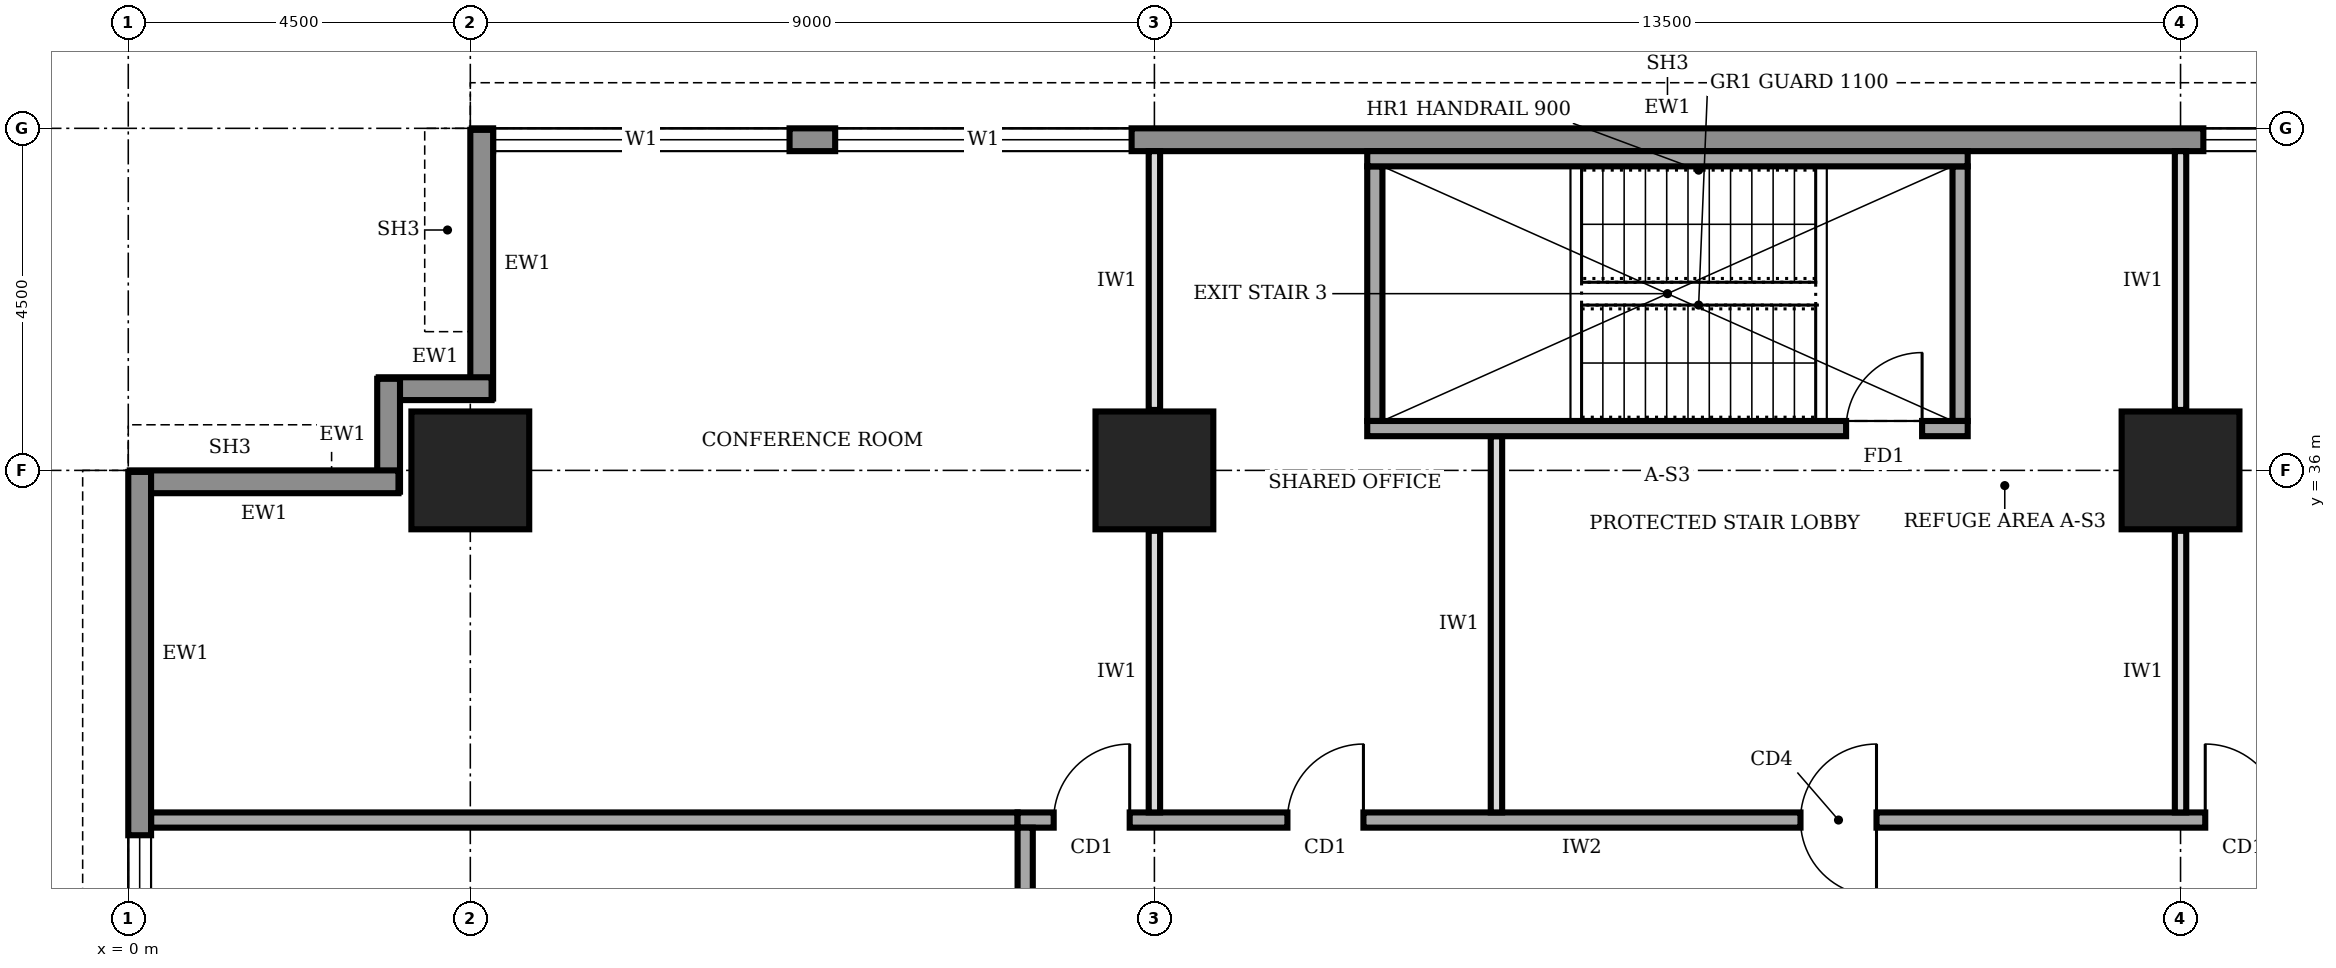
"""IFC4 building model, lengths in metres.
Left out: names, types, materials, properties, quantities, classifications, styles, units other than length and angle.
Written with IfcOpenShell. Run it as: python <this file> out.ifc"""

import sys

from ifc_helpers import new_model, si_unit, direction, frame, frame_2d, origin, origin_2d, place, context, subcontext, project, spatial, rectangle, extrude, element, fill, save


model = new_model("IFC4")
c1 = context("Model", 3, precision=1e-05, world=origin(), true_north=direction((0.0, 1.0)))
c2 = subcontext(c1, "Body", "Model", "MODEL_VIEW")
j1 = project(units=[si_unit("LENGTHUNIT", "METRE"), si_unit("PLANEANGLEUNIT", "RADIAN")], contexts=[c1])
p1 = place(None, origin())
s1 = spatial("IfcSite", under=j1, at=p1, CompositionType="ELEMENT")
p2 = place(p1, origin())
s2 = spatial("IfcBuilding", under=s1, at=p2, CompositionType="ELEMENT")
p3 = place(p2, frame((0.0, 0.0, 205.0)))
s3 = spatial("IfcBuildingStorey", under=s2, at=p3, CompositionType="ELEMENT", Elevation=205.0)
for number, where, z_axis, x_axis in (
    (1, (4.5, 36.0, 0.0), (0.0, 0.0, 1.0), (1.0, 0.0, 0.0)),
    (2, (13.5, 36.0, 0.0), (0.0, 0.0, 1.0), (1.0, 0.0, 0.0)),
    (3, (27.0, 36.0, 0.0), (0.0, 0.0, 1.0), (1.0, 0.0, 0.0)),
):
    element("IfcColumn", number, at=place(p3, frame(where, z_axis=z_axis, x_axis=x_axis)), inside=s3, PredefinedType="COLUMN", context=c2, shape_type="SweptSolid", body=[
        extrude(rectangle(XDim=1.55, YDim=1.55, at=origin_2d()), origin(), (0.0, 0.0, 1.0), 4.0),
    ])
p4 = place(p3, frame((35.98, 40.35, 0.0), z_axis=(0.0, 0.0, 1.0), x_axis=(-1.0, 0.0, 0.0)))
e4 = element("IfcWall", 4, at=p4, inside=s3, PredefinedType="STANDARD", context=c2, shape_type="SweptSolid", body=[
    extrude(rectangle(XDim=31.46, YDim=0.3, at=frame_2d((15.73, 0.0))), origin(), (0.0, 0.0, 1.0), 3.75),
])
p5 = place(p4, frame((27.28, 0.0, 0.9)))
e5 = element("IfcOpeningElement", 5, at=p5, cuts=e4, PredefinedType="OPENING", context=c2, shape_type="SweptSolid", body=[
    extrude(rectangle(XDim=3.9, YDim=2.2, at=frame_2d((1.95, 1.1))), frame((0.0, 0.16, 0.0), z_axis=(0.0, -1.0, 0.0), x_axis=(1.0, 0.0, 0.0)), (0.0, 0.0, 1.0), 0.32),
])
p6 = place(p4, frame((22.78, 0.0, 0.9)))
e6 = element("IfcOpeningElement", 6, at=p6, cuts=e4, PredefinedType="OPENING", context=c2, shape_type="SweptSolid", body=[
    extrude(rectangle(XDim=3.9, YDim=2.2, at=frame_2d((1.95, 1.1))), frame((0.0, 0.16, 0.0), z_axis=(0.0, -1.0, 0.0), x_axis=(1.0, 0.0, 0.0)), (0.0, 0.0, 1.0), 0.32),
])
p7 = place(p4, frame((4.78, 0.0, 0.9)))
e7 = element("IfcOpeningElement", 7, at=p7, cuts=e4, PredefinedType="OPENING", context=c2, shape_type="SweptSolid", body=[
    extrude(rectangle(XDim=3.9, YDim=2.2, at=frame_2d((1.95, 1.1))), frame((0.0, 0.16, 0.0), z_axis=(0.0, -1.0, 0.0), x_axis=(1.0, 0.0, 0.0)), (0.0, 0.0, 1.0), 0.32),
])
p8 = place(p3, frame((4.65, 40.48, 0.0), z_axis=(0.0, 0.0, 1.0), x_axis=(0.0, -1.0, 0.0)))
e8 = element("IfcWall", 8, at=p8, inside=s3, PredefinedType="STANDARD", context=c2, shape_type="SweptSolid", body=[
    extrude(rectangle(XDim=3.535, YDim=0.3, at=frame_2d((1.768, 0.0))), origin(), (0.0, 0.0, 1.0), 2.85),
])
for number, where, z_axis, x_axis in (
    (9, (4.78, 37.075, 0.0), (0.0, 0.0, 1.0), (-1.0, 0.0, 0.0)),
    (10, (3.425, 37.205, 0.0), (0.0, 0.0, 1.0), (0.0, -1.0, 0.0)),
):
    element("IfcWall", number, at=place(p3, frame(where, z_axis=z_axis, x_axis=x_axis)), inside=s3, PredefinedType="STANDARD", context=c2, shape_type="SweptSolid", body=[
        extrude(rectangle(XDim=1.485, YDim=0.3, at=frame_2d((0.743, 0.0))), origin(), (0.0, 0.0, 1.0), 3.75),
    ])
p9 = place(p3, frame((3.555, 35.85, 0.0), z_axis=(0.0, 0.0, 1.0), x_axis=(-1.0, 0.0, 0.0)))
e11 = element("IfcWall", 11, at=p9, inside=s3, PredefinedType="STANDARD", context=c2, shape_type="SweptSolid", body=[
    extrude(rectangle(XDim=3.535, YDim=0.3, at=frame_2d((1.768, 0.0))), origin(), (0.0, 0.0, 1.0), 2.85),
])
p10 = place(p3, frame((0.15, 35.98, 0.0), z_axis=(0.0, 0.0, 1.0), x_axis=(0.0, -1.0, 0.0)))
e12 = element("IfcWall", 12, at=p10, inside=s3, PredefinedType="STANDARD", context=c2, shape_type="SweptSolid", body=[
    extrude(rectangle(XDim=31.46, YDim=0.3, at=frame_2d((15.73, 0.0))), origin(), (0.0, 0.0, 1.0), 3.75),
])
p11 = place(p10, frame((27.28, 0.0, 0.9)))
e13 = element("IfcOpeningElement", 13, at=p11, cuts=e12, PredefinedType="OPENING", context=c2, shape_type="SweptSolid", body=[
    extrude(rectangle(XDim=3.9, YDim=2.2, at=frame_2d((1.95, 1.1))), frame((0.0, 0.16, 0.0), z_axis=(0.0, -1.0, 0.0), x_axis=(1.0, 0.0, 0.0)), (0.0, 0.0, 1.0), 0.32),
])
p12 = place(p10, frame((22.78, 0.0, 0.9)))
e14 = element("IfcOpeningElement", 14, at=p12, cuts=e12, PredefinedType="OPENING", context=c2, shape_type="SweptSolid", body=[
    extrude(rectangle(XDim=3.9, YDim=2.2, at=frame_2d((1.95, 1.1))), frame((0.0, 0.16, 0.0), z_axis=(0.0, -1.0, 0.0), x_axis=(1.0, 0.0, 0.0)), (0.0, 0.0, 1.0), 0.32),
])
p13 = place(p10, frame((18.28, 0.0, 0.9)))
e15 = element("IfcOpeningElement", 15, at=p13, cuts=e12, PredefinedType="OPENING", context=c2, shape_type="SweptSolid", body=[
    extrude(rectangle(XDim=3.9, YDim=2.2, at=frame_2d((1.95, 1.1))), frame((0.0, 0.16, 0.0), z_axis=(0.0, -1.0, 0.0), x_axis=(1.0, 0.0, 0.0)), (0.0, 0.0, 1.0), 0.32),
])
p14 = place(p10, frame((13.78, 0.0, 0.9)))
e16 = element("IfcOpeningElement", 16, at=p14, cuts=e12, PredefinedType="OPENING", context=c2, shape_type="SweptSolid", body=[
    extrude(rectangle(XDim=3.9, YDim=2.2, at=frame_2d((1.95, 1.1))), frame((0.0, 0.16, 0.0), z_axis=(0.0, -1.0, 0.0), x_axis=(1.0, 0.0, 0.0)), (0.0, 0.0, 1.0), 0.32),
])
p15 = place(p10, frame((9.28, 0.0, 0.9)))
e17 = element("IfcOpeningElement", 17, at=p15, cuts=e12, PredefinedType="OPENING", context=c2, shape_type="SweptSolid", body=[
    extrude(rectangle(XDim=3.9, YDim=2.2, at=frame_2d((1.95, 1.1))), frame((0.0, 0.16, 0.0), z_axis=(0.0, -1.0, 0.0), x_axis=(1.0, 0.0, 0.0)), (0.0, 0.0, 1.0), 0.32),
])
p16 = place(p10, frame((4.78, 0.0, 0.9)))
e18 = element("IfcOpeningElement", 18, at=p16, cuts=e12, PredefinedType="OPENING", context=c2, shape_type="SweptSolid", body=[
    extrude(rectangle(XDim=3.9, YDim=2.2, at=frame_2d((1.95, 1.1))), frame((0.0, 0.16, 0.0), z_axis=(0.0, -1.0, 0.0), x_axis=(1.0, 0.0, 0.0)), (0.0, 0.0, 1.0), 0.32),
])
p17 = place(p3, frame((28.6, 31.4, 0.0), z_axis=(0.0, 0.0, 1.0), x_axis=(-1.0, 0.0, 0.0)))
e19 = element("IfcWall", 19, at=p17, inside=s3, PredefinedType="SOLIDWALL", context=c2, shape_type="SweptSolid", body=[
    extrude(rectangle(XDim=16.9, YDim=0.2, at=frame_2d((8.45, 0.0))), origin(), (0.0, 0.0, 1.0), 3.75),
])
p18 = place(p17, frame((15.425, 0.0, 0.0)))
e20 = element("IfcOpeningElement", 20, at=p18, cuts=e19, PredefinedType="OPENING", context=c2, shape_type="SweptSolid", body=[
    extrude(rectangle(XDim=1.0, YDim=2.1, at=frame_2d((0.5, 1.05))), frame((0.0, 0.11, 0.0), z_axis=(0.0, -1.0, 0.0), x_axis=(1.0, 0.0, 0.0)), (0.0, 0.0, 1.0), 0.22),
])
p19 = place(p17, frame((12.35, 0.0, 0.0)))
e21 = element("IfcOpeningElement", 21, at=p19, cuts=e19, PredefinedType="OPENING", context=c2, shape_type="SweptSolid", body=[
    extrude(rectangle(XDim=1.0, YDim=2.1, at=frame_2d((0.5, 1.05))), frame((0.0, 0.11, 0.0), z_axis=(0.0, -1.0, 0.0), x_axis=(1.0, 0.0, 0.0)), (0.0, 0.0, 1.0), 0.22),
])
p20 = place(p17, frame((5.6, 0.0, 0.0)))
e22 = element("IfcOpeningElement", 22, at=p20, cuts=e19, PredefinedType="OPENING", context=c2, shape_type="SweptSolid", body=[
    extrude(rectangle(XDim=1.0, YDim=2.1, at=frame_2d((0.5, 1.05))), frame((0.0, 0.11, 0.0), z_axis=(0.0, -1.0, 0.0), x_axis=(1.0, 0.0, 0.0)), (0.0, 0.0, 1.0), 0.22),
])
p21 = place(p17, frame((0.275, 0.0, 0.0)))
e23 = element("IfcOpeningElement", 23, at=p21, cuts=e19, PredefinedType="OPENING", context=c2, shape_type="SweptSolid", body=[
    extrude(rectangle(XDim=1.0, YDim=2.1, at=frame_2d((0.5, 1.05))), frame((0.0, 0.11, 0.0), z_axis=(0.0, -1.0, 0.0), x_axis=(1.0, 0.0, 0.0)), (0.0, 0.0, 1.0), 0.22),
])
p22 = place(p3, frame((11.8, 31.3, 0.0), z_axis=(0.0, 0.0, 1.0), x_axis=(0.0, -1.0, 0.0)))
e24 = element("IfcWall", 24, at=p22, inside=s3, PredefinedType="SOLIDWALL", context=c2, shape_type="SweptSolid", body=[
    extrude(rectangle(XDim=23.8, YDim=0.2, at=frame_2d((11.9, 0.0))), origin(), (0.0, 0.0, 1.0), 3.75),
])
p23 = place(p22, frame((20.3, 0.0, 0.0)))
e25 = element("IfcOpeningElement", 25, at=p23, cuts=e24, PredefinedType="OPENING", context=c2, shape_type="SweptSolid", body=[
    extrude(rectangle(XDim=1.0, YDim=2.1, at=frame_2d((0.5, 1.05))), frame((0.0, 0.11, 0.0), z_axis=(0.0, -1.0, 0.0), x_axis=(1.0, 0.0, 0.0)), (0.0, 0.0, 1.0), 0.22),
])
p24 = place(p22, frame((15.45, 0.0, 0.0)))
e26 = element("IfcOpeningElement", 26, at=p24, cuts=e24, PredefinedType="OPENING", context=c2, shape_type="SweptSolid", body=[
    extrude(rectangle(XDim=0.9, YDim=2.1, at=frame_2d((0.45, 1.05))), frame((0.0, 0.11, 0.0), z_axis=(0.0, -1.0, 0.0), x_axis=(1.0, 0.0, 0.0)), (0.0, 0.0, 1.0), 0.22),
])
p25 = place(p22, frame((12.45, 0.0, 0.0)))
e27 = element("IfcOpeningElement", 27, at=p25, cuts=e24, PredefinedType="OPENING", context=c2, shape_type="SweptSolid", body=[
    extrude(rectangle(XDim=0.9, YDim=2.1, at=frame_2d((0.45, 1.05))), frame((0.0, 0.11, 0.0), z_axis=(0.0, -1.0, 0.0), x_axis=(1.0, 0.0, 0.0)), (0.0, 0.0, 1.0), 0.22),
])
p26 = place(p22, frame((7.6, 0.0, 0.0)))
e28 = element("IfcOpeningElement", 28, at=p26, cuts=e24, PredefinedType="OPENING", context=c2, shape_type="SweptSolid", body=[
    extrude(rectangle(XDim=0.9, YDim=2.1, at=frame_2d((0.45, 1.05))), frame((0.0, 0.11, 0.0), z_axis=(0.0, -1.0, 0.0), x_axis=(1.0, 0.0, 0.0)), (0.0, 0.0, 1.0), 0.22),
])
p27 = place(p22, frame((4.8, 0.0, 0.0)))
e29 = element("IfcOpeningElement", 29, at=p27, cuts=e24, PredefinedType="OPENING", context=c2, shape_type="SweptSolid", body=[
    extrude(rectangle(XDim=1.0, YDim=2.1, at=frame_2d((0.5, 1.05))), frame((0.0, 0.11, 0.0), z_axis=(0.0, -1.0, 0.0), x_axis=(1.0, 0.0, 0.0)), (0.0, 0.0, 1.0), 0.22),
])
p28 = place(p22, frame((10.3, 0.0, 0.0)))
e30 = element("IfcOpeningElement", 30, at=p28, cuts=e24, PredefinedType="OPENING", context=c2, shape_type="SweptSolid", body=[
    extrude(rectangle(XDim=1.0, YDim=2.1, at=frame_2d((0.5, 1.05))), frame((0.0, 0.11, 0.0), z_axis=(0.0, -1.0, 0.0), x_axis=(1.0, 0.0, 0.0)), (0.0, 0.0, 1.0), 0.22),
])
p29 = place(p22, frame((1.55, 0.0, 0.0)))
e31 = element("IfcOpeningElement", 31, at=p29, cuts=e24, PredefinedType="OPENING", context=c2, shape_type="SweptSolid", body=[
    extrude(rectangle(XDim=1.0, YDim=2.1, at=frame_2d((0.5, 1.05))), frame((0.0, 0.11, 0.0), z_axis=(0.0, -1.0, 0.0), x_axis=(1.0, 0.0, 0.0)), (0.0, 0.0, 1.0), 0.22),
])
p30 = place(p3, frame((0.3, 31.4, 0.0), z_axis=(0.0, 0.0, 1.0), x_axis=(1.0, 0.0, 0.0)))
e32 = element("IfcWall", 32, at=p30, inside=s3, PredefinedType="SOLIDWALL", context=c2, shape_type="SweptSolid", body=[
    extrude(rectangle(XDim=11.4, YDim=0.2, at=frame_2d((5.7, 0.0))), origin(), (0.0, 0.0, 1.0), 3.75),
])
p31 = place(p3, frame((13.5, 31.5, 0.0), z_axis=(0.0, 0.0, 1.0), x_axis=(0.0, 1.0, 0.0)))
e33 = element("IfcWall", 33, at=p31, inside=s3, PredefinedType="PARTITIONING", context=c2, shape_type="SweptSolid", body=[
    extrude(rectangle(XDim=3.705, YDim=0.15, at=frame_2d((1.853, 0.0))), origin(), (0.0, 0.0, 1.0), 2.85),
])
p32 = place(p3, frame((13.5, 36.795, 0.0), z_axis=(0.0, 0.0, 1.0), x_axis=(0.0, 1.0, 0.0)))
e34 = element("IfcWall", 34, at=p32, inside=s3, PredefinedType="PARTITIONING", context=c2, shape_type="SweptSolid", body=[
    extrude(rectangle(XDim=3.405, YDim=0.15, at=frame_2d((1.703, 0.0))), origin(), (0.0, 0.0, 1.0), 2.85),
])
p33 = place(p3, frame((18.0, 31.5, 0.0), z_axis=(0.0, 0.0, 1.0), x_axis=(0.0, 1.0, 0.0)))
e35 = element("IfcWall", 35, at=p33, inside=s3, PredefinedType="PARTITIONING", context=c2, shape_type="SweptSolid", body=[
    extrude(rectangle(XDim=4.95, YDim=0.15, at=frame_2d((2.475, 0.0))), origin(), (0.0, 0.0, 1.0), 3.75),
])
p34 = place(p3, frame((27.0, 31.5, 0.0), z_axis=(0.0, 0.0, 1.0), x_axis=(0.0, 1.0, 0.0)))
e36 = element("IfcWall", 36, at=p34, inside=s3, PredefinedType="PARTITIONING", context=c2, shape_type="SweptSolid", body=[
    extrude(rectangle(XDim=3.705, YDim=0.15, at=frame_2d((1.853, 0.0))), origin(), (0.0, 0.0, 1.0), 2.85),
])
p35 = place(p3, frame((27.0, 36.795, 0.0), z_axis=(0.0, 0.0, 1.0), x_axis=(0.0, 1.0, 0.0)))
e37 = element("IfcWall", 37, at=p35, inside=s3, PredefinedType="PARTITIONING", context=c2, shape_type="SweptSolid", body=[
    extrude(rectangle(XDim=3.405, YDim=0.15, at=frame_2d((1.703, 0.0))), origin(), (0.0, 0.0, 1.0), 2.85),
])
p36 = place(p3, frame((16.3, 36.55, 0.0), z_axis=(0.0, 0.0, 1.0), x_axis=(1.0, 0.0, 0.0)))
e38 = element("IfcWall", 38, at=p36, inside=s3, PredefinedType="SOLIDWALL", context=c2, shape_type="SweptSolid", body=[
    extrude(rectangle(XDim=7.9, YDim=0.2, at=frame_2d((3.95, 0.0))), origin(), (0.0, 0.0, 1.0), 3.75),
])
p37 = place(p36, frame((6.3, 0.0, 0.0)))
e39 = element("IfcOpeningElement", 39, at=p37, cuts=e38, PredefinedType="OPENING", context=c2, shape_type="SweptSolid", body=[
    extrude(rectangle(XDim=1.0, YDim=2.1, at=frame_2d((0.5, 1.05))), frame((0.0, 0.11, 0.0), z_axis=(0.0, -1.0, 0.0), x_axis=(1.0, 0.0, 0.0)), (0.0, 0.0, 1.0), 0.22),
])
p38 = place(p3, frame((16.3, 40.1, 0.0), z_axis=(0.0, 0.0, 1.0), x_axis=(1.0, 0.0, 0.0)))
e40 = element("IfcWall", 40, at=p38, inside=s3, PredefinedType="SOLIDWALL", context=c2, shape_type="SweptSolid", body=[
    extrude(rectangle(XDim=7.9, YDim=0.2, at=frame_2d((3.95, 0.0))), origin(), (0.0, 0.0, 1.0), 3.75),
])
for number, where, z_axis, x_axis in (
    (41, (16.4, 36.65, 0.0), (0.0, 0.0, 1.0), (0.0, 1.0, 0.0)),
    (42, (24.1, 36.65, 0.0), (0.0, 0.0, 1.0), (0.0, 1.0, 0.0)),
):
    element("IfcWall", number, at=place(p3, frame(where, z_axis=z_axis, x_axis=x_axis)), inside=s3, PredefinedType="SOLIDWALL", context=c2, shape_type="SweptSolid", body=[
        extrude(rectangle(XDim=3.35, YDim=0.2, at=frame_2d((1.675, 0.0))), origin(), (0.0, 0.0, 1.0), 3.75),
    ])
p39 = place(p5, origin())
e43 = element("IfcWindow", 43, at=p39, inside=s3, PartitioningType="SINGLE_PANEL", PredefinedType="WINDOW", context=c2, shape_type="SweptSolid", body=[
    extrude(rectangle(XDim=3.9, YDim=2.2, at=frame_2d((1.95, 1.1))), frame((0.0, 0.03, 0.0), z_axis=(0.0, -1.0, 0.0), x_axis=(1.0, 0.0, 0.0)), (0.0, 0.0, 1.0), 0.06),
])
fill(e5, e43)
p40 = place(p6, origin())
e44 = element("IfcWindow", 44, at=p40, inside=s3, PartitioningType="SINGLE_PANEL", PredefinedType="WINDOW", context=c2, shape_type="SweptSolid", body=[
    extrude(rectangle(XDim=3.9, YDim=2.2, at=frame_2d((1.95, 1.1))), frame((0.0, 0.03, 0.0), z_axis=(0.0, -1.0, 0.0), x_axis=(1.0, 0.0, 0.0)), (0.0, 0.0, 1.0), 0.06),
])
fill(e6, e44)
p41 = place(p7, origin())
e45 = element("IfcWindow", 45, at=p41, inside=s3, PartitioningType="SINGLE_PANEL", PredefinedType="WINDOW", context=c2, shape_type="SweptSolid", body=[
    extrude(rectangle(XDim=3.9, YDim=2.2, at=frame_2d((1.95, 1.1))), frame((0.0, 0.03, 0.0), z_axis=(0.0, -1.0, 0.0), x_axis=(1.0, 0.0, 0.0)), (0.0, 0.0, 1.0), 0.06),
])
fill(e7, e45)
p42 = place(p16, origin())
e46 = element("IfcWindow", 46, at=p42, inside=s3, PartitioningType="SINGLE_PANEL", PredefinedType="WINDOW", context=c2, shape_type="SweptSolid", body=[
    extrude(rectangle(XDim=3.9, YDim=2.2, at=frame_2d((1.95, 1.1))), frame((0.0, 0.03, 0.0), z_axis=(0.0, -1.0, 0.0), x_axis=(1.0, 0.0, 0.0)), (0.0, 0.0, 1.0), 0.06),
])
fill(e18, e46)
p43 = place(p18, frame((1.0, 0.0, 0.0), z_axis=(0.0, 0.0, 1.0), x_axis=(-1.0, 0.0, 0.0)))
e47 = element("IfcDoor", 47, at=p43, inside=s3, OperationType="SINGLE_SWING_RIGHT", PredefinedType="DOOR", context=c2, shape_type="SweptSolid", body=[
    extrude(rectangle(XDim=1.0, YDim=2.1, at=frame_2d((0.5, 1.05))), frame((0.0, 0.025, 0.0), z_axis=(0.0, -1.0, 0.0), x_axis=(1.0, 0.0, 0.0)), (0.0, 0.0, 1.0), 0.05),
])
fill(e20, e47)
p44 = place(p19, frame((1.0, 0.0, 0.0), z_axis=(0.0, 0.0, 1.0), x_axis=(-1.0, 0.0, 0.0)))
e48 = element("IfcDoor", 48, at=p44, inside=s3, OperationType="SINGLE_SWING_RIGHT", PredefinedType="DOOR", context=c2, shape_type="SweptSolid", body=[
    extrude(rectangle(XDim=1.0, YDim=2.1, at=frame_2d((0.5, 1.05))), frame((0.0, 0.025, 0.0), z_axis=(0.0, -1.0, 0.0), x_axis=(1.0, 0.0, 0.0)), (0.0, 0.0, 1.0), 0.05),
])
fill(e21, e48)
p45 = place(p20, origin())
e49 = element("IfcDoor", 49, at=p45, inside=s3, OperationType="DOUBLE_SWING_LEFT", PredefinedType="DOOR", context=c2, shape_type="SweptSolid", body=[
    extrude(rectangle(XDim=1.0, YDim=2.1, at=frame_2d((0.5, 1.05))), frame((0.0, 0.025, 0.0), z_axis=(0.0, -1.0, 0.0), x_axis=(1.0, 0.0, 0.0)), (0.0, 0.0, 1.0), 0.05),
])
fill(e22, e49)
p46 = place(p21, frame((1.0, 0.0, 0.0), z_axis=(0.0, 0.0, 1.0), x_axis=(-1.0, 0.0, 0.0)))
e50 = element("IfcDoor", 50, at=p46, inside=s3, OperationType="SINGLE_SWING_LEFT", PredefinedType="DOOR", context=c2, shape_type="SweptSolid", body=[
    extrude(rectangle(XDim=1.0, YDim=2.1, at=frame_2d((0.5, 1.05))), frame((0.0, 0.025, 0.0), z_axis=(0.0, -1.0, 0.0), x_axis=(1.0, 0.0, 0.0)), (0.0, 0.0, 1.0), 0.05),
])
fill(e23, e50)
p47 = place(p37, origin())
e51 = element("IfcDoor", 51, at=p47, inside=s3, OperationType="SINGLE_SWING_RIGHT", PredefinedType="DOOR", context=c2, shape_type="SweptSolid", body=[
    extrude(rectangle(XDim=1.0, YDim=2.1, at=frame_2d((0.5, 1.05))), frame((0.0, 0.025, 0.0), z_axis=(0.0, -1.0, 0.0), x_axis=(1.0, 0.0, 0.0)), (0.0, 0.0, 1.0), 0.05),
])
fill(e39, e51)
save(model, sys.argv[1])
